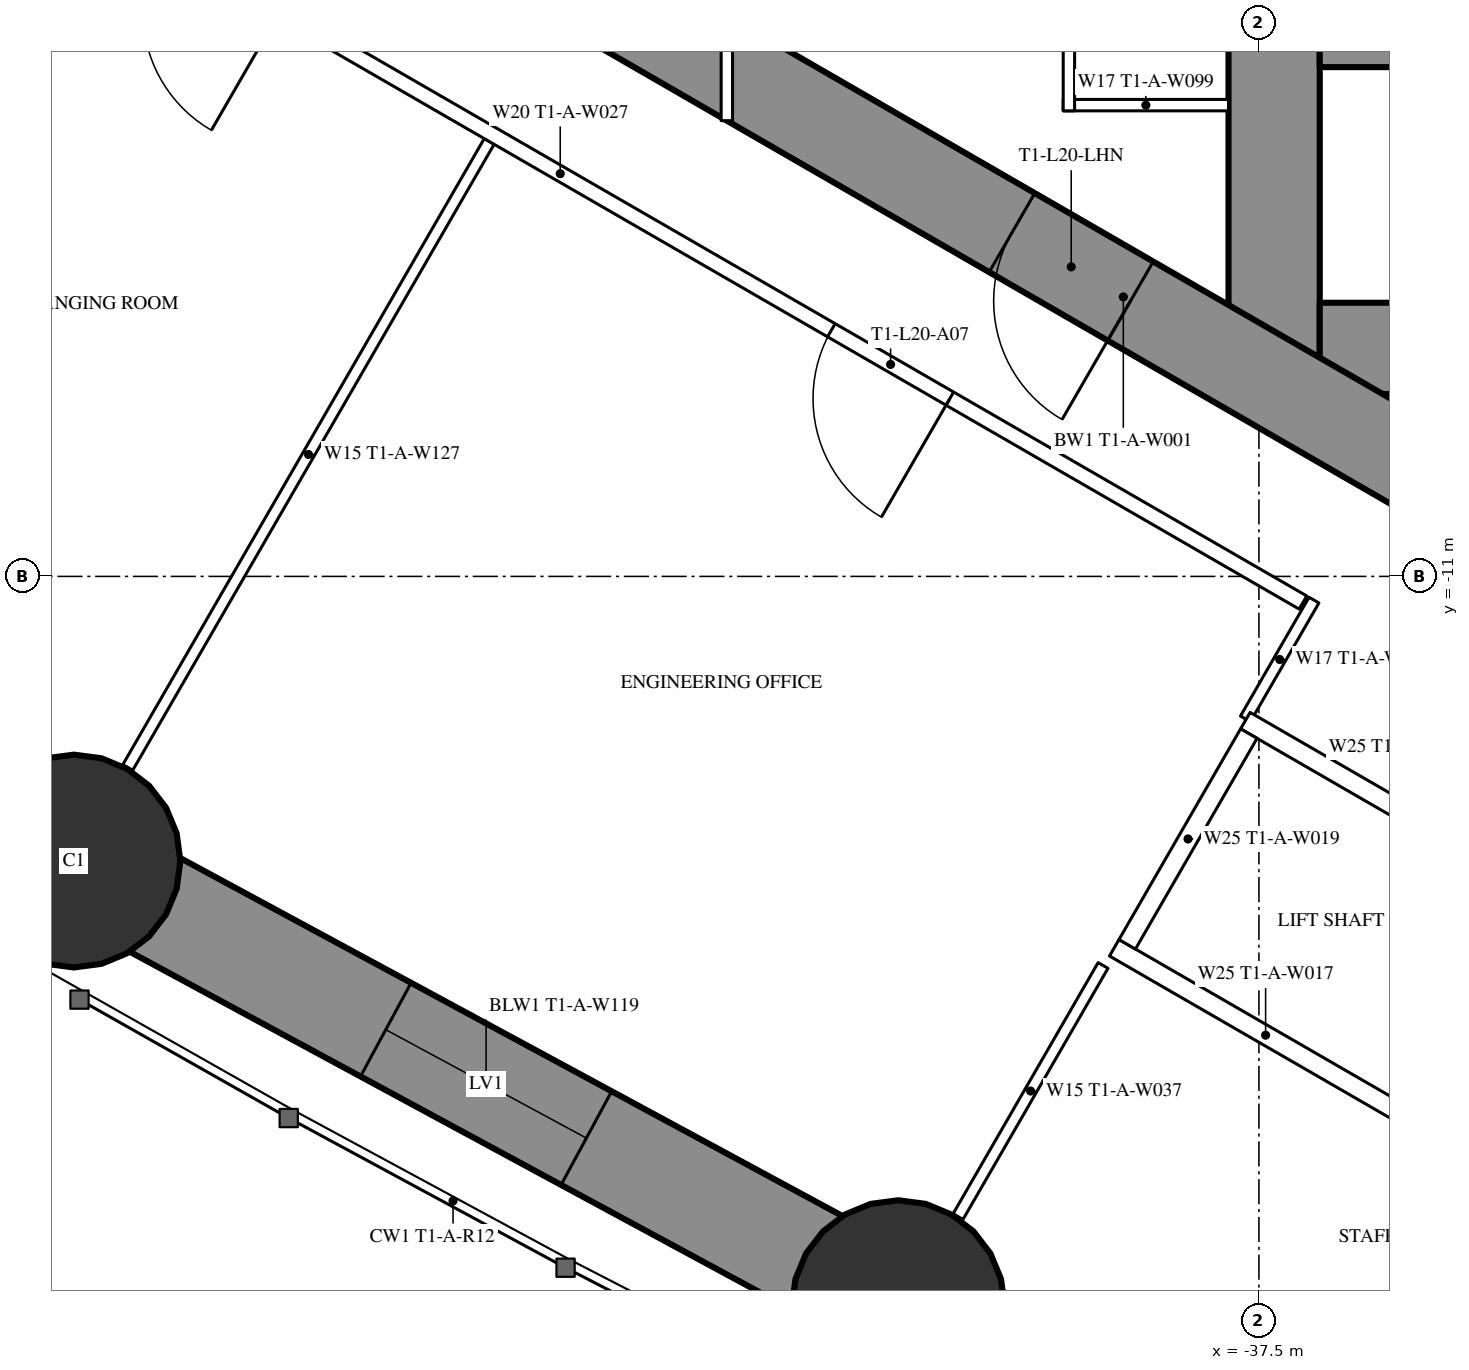
"""IFC4 building model, lengths in metres.
Left out: names, types, materials, properties, quantities, classifications, styles, units other than length and angle.
Written with IfcOpenShell. Run it as: python <this file> out.ifc"""

import sys

from ifc_helpers import new_model, si_unit, direction, frame, frame_2d, origin, origin_2d, place, context, subcontext, project, spatial, rectangle, hollow_circle, extrude, element, fill, save


model = new_model("IFC4")
c1 = context("Model", 3, precision=1e-05, world=origin(), true_north=direction((0.0, 1.0)))
c2 = subcontext(c1, "Body", "Model", "MODEL_VIEW")
j1 = project(units=[si_unit("LENGTHUNIT", "METRE"), si_unit("PLANEANGLEUNIT", "RADIAN")], contexts=[c1])
p1 = place(None, origin())
s1 = spatial("IfcSite", under=j1, at=p1, CompositionType="ELEMENT")
p2 = place(p1, origin())
s2 = spatial("IfcBuilding", under=s1, at=p2, CompositionType="ELEMENT")
p3 = place(p2, frame((0.0, 0.0, 77.5)))
s3 = spatial("IfcBuildingStorey", under=s2, at=p3, CompositionType="ELEMENT", Elevation=77.5)
for number, where, z_axis, x_axis in (
    (1, (-53.09, -14.745, 0.0), (0.0, 0.0, 1.0), (1.0, 0.0, 0.0)),
    (2, (-42.245, -20.607, 0.0), (0.0, 0.0, 1.0), (1.0, 0.0, 0.0)),
):
    element("IfcColumn", number, at=place(p3, frame(where, z_axis=z_axis, x_axis=x_axis)), inside=s3, PredefinedType="COLUMN", context=c2, shape_type="SweptSolid", body=[
        extrude(hollow_circle(Radius=1.4, WallThickness=0.12, at=origin_2d()), origin(), (0.0, 0.0, 1.0), 3.5),
    ])
p4 = place(p3, frame((-37.3, 8.6, 0.0), z_axis=(0.0, 0.0, 1.0), x_axis=(0.0, -1.0, 0.0)))
e3 = element("IfcWall", 3, at=p4, inside=s3, PredefinedType="SHEAR", context=c2, shape_type="SweptSolid", body=[
    extrude(rectangle(XDim=17.2, YDim=1.2, at=frame_2d((8.6, 0.0))), origin(), (0.0, 0.0, 1.0), 3.5),
])
p5 = place(p4, frame((7.7, 0.0, 0.0)))
e4 = element("IfcOpeningElement", 4, at=p5, cuts=e3, PredefinedType="OPENING", context=c2, shape_type="SweptSolid", body=[
    extrude(rectangle(XDim=1.8, YDim=2.2, at=frame_2d((0.9, 1.1))), frame((0.0, 0.61, 0.0), z_axis=(0.0, -1.0, 0.0), x_axis=(1.0, 0.0, 0.0)), (0.0, 0.0, 1.0), 1.22),
])
p6 = place(p3, frame((-28.3, -8.0, 0.0), z_axis=(0.0, 0.0, 1.0), x_axis=(-1.0, 0.0, 0.0)))
e5 = element("IfcWall", 5, at=p6, inside=s3, PredefinedType="SHEAR", context=c2, shape_type="SweptSolid", body=[
    extrude(rectangle(XDim=8.4, YDim=1.2, at=frame_2d((4.2, 0.0))), origin(), (0.0, 0.0, 1.0), 3.5),
])
p7 = place(p6, frame((0.25, 0.0, 0.0)))
e6 = element("IfcOpeningElement", 6, at=p7, cuts=e5, PredefinedType="OPENING", context=c2, shape_type="SweptSolid", body=[
    extrude(rectangle(XDim=1.0, YDim=2.2, at=frame_2d((0.5, 1.1))), frame((0.0, 0.61, 0.0), z_axis=(0.0, -1.0, 0.0), x_axis=(1.0, 0.0, 0.0)), (0.0, 0.0, 1.0), 1.22),
])
p8 = place(p3, frame((-28.3, -4.15, 0.0), z_axis=(0.0, 0.0, 1.0), x_axis=(-1.0, 0.0, 0.0)))
e7 = element("IfcWall", 7, at=p8, inside=s3, PredefinedType="SHEAR", context=c2, shape_type="SweptSolid", body=[
    extrude(rectangle(XDim=8.4, YDim=0.3, at=frame_2d((4.2, 0.0))), origin(), (0.0, 0.0, 1.0), 3.5),
])
p9 = place(p3, frame((-27.2, -14.3, 0.0), z_axis=(0.0, 0.0, 1.0), x_axis=(-0.866024021859, 0.500002393557, 0.0)))
e8 = element("IfcWall", 8, at=p9, inside=s3, PredefinedType="SHEAR", context=c2, shape_type="SweptSolid", body=[
    extrude(rectangle(XDim=27.907, YDim=1.2, at=frame_2d((13.954, 0.0))), origin(), (0.0, 0.0, 1.0), 3.5),
])
p10 = place(p9, frame((4.6, 0.0, 0.0)))
e9 = element("IfcOpeningElement", 9, at=p10, cuts=e8, PredefinedType="OPENING", context=c2, shape_type="SweptSolid", body=[
    extrude(rectangle(XDim=1.0, YDim=2.2, at=frame_2d((0.5, 1.1))), frame((0.0, 0.61, 0.0), z_axis=(0.0, -1.0, 0.0), x_axis=(1.0, 0.0, 0.0)), (0.0, 0.0, 1.0), 1.22),
])
p11 = place(p9, frame((13.845, 0.0, 0.0)))
e10 = element("IfcOpeningElement", 10, at=p11, cuts=e8, PredefinedType="OPENING", context=c2, shape_type="SweptSolid", body=[
    extrude(rectangle(XDim=1.8, YDim=2.2, at=frame_2d((0.9, 1.1))), frame((0.0, 0.61, 0.0), z_axis=(0.0, -1.0, 0.0), x_axis=(1.0, 0.0, 0.0)), (0.0, 0.0, 1.0), 1.22),
])
p12 = place(p3, frame((-63.572, -8.255, 0.0), z_axis=(0.0, 0.0, 1.0), x_axis=(0.850225894333, -0.526418016984, 0.0)))
e11 = element("IfcWall", 11, at=p12, inside=s3, PredefinedType="SHEAR", context=c2, shape_type="SweptSolid", body=[
    extrude(rectangle(XDim=12.328, YDim=1.4, at=frame_2d((6.164, 0.0))), origin(), (0.0, 0.0, 1.0), 3.5),
])
p13 = place(p12, frame((4.664, 0.0, 0.6)))
e12 = element("IfcOpeningElement", 12, at=p13, cuts=e11, PredefinedType="OPENING", context=c2, shape_type="SweptSolid", body=[
    extrude(rectangle(XDim=3.0, YDim=1.2, at=frame_2d((1.5, 0.6))), frame((0.0, 0.71, 0.0), z_axis=(0.0, -1.0, 0.0), x_axis=(1.0, 0.0, 0.0)), (0.0, 0.0, 1.0), 1.42),
])
p14 = place(p3, frame((-53.09, -14.745, 0.0), z_axis=(0.0, 0.0, 1.0), x_axis=(0.879692855603, -0.475542300749, 0.0)))
e13 = element("IfcWall", 13, at=p14, inside=s3, PredefinedType="SHEAR", context=c2, shape_type="SweptSolid", body=[
    extrude(rectangle(XDim=12.328, YDim=1.4, at=frame_2d((6.164, 0.0))), origin(), (0.0, 0.0, 1.0), 3.5),
])
p15 = place(p14, frame((4.664, 0.0, 0.6)))
e14 = element("IfcOpeningElement", 14, at=p15, cuts=e13, PredefinedType="OPENING", context=c2, shape_type="SweptSolid", body=[
    extrude(rectangle(XDim=3.0, YDim=1.2, at=frame_2d((1.5, 0.6))), frame((0.0, 0.71, 0.0), z_axis=(0.0, -1.0, 0.0), x_axis=(1.0, 0.0, 0.0)), (0.0, 0.0, 1.0), 1.42),
])
p16 = place(p3, frame((-42.245, -20.607, 0.0), z_axis=(0.0, 0.0, 1.0), x_axis=(0.926463236197, -0.376385270667, 0.0)))
e15 = element("IfcWall", 15, at=p16, inside=s3, PredefinedType="SHEAR", context=c2, shape_type="SweptSolid", body=[
    extrude(rectangle(XDim=13.537, YDim=1.4, at=frame_2d((6.769, 0.0))), origin(), (0.0, 0.0, 1.0), 3.5),
])
p17 = place(p16, frame((5.269, 0.0, 0.6)))
e16 = element("IfcOpeningElement", 16, at=p17, cuts=e15, PredefinedType="OPENING", context=c2, shape_type="SweptSolid", body=[
    extrude(rectangle(XDim=3.0, YDim=1.2, at=frame_2d((1.5, 0.6))), frame((0.0, 0.71, 0.0), z_axis=(0.0, -1.0, 0.0), x_axis=(1.0, 0.0, 0.0)), (0.0, 0.0, 1.0), 1.42),
])
p18 = place(p3, frame((-47.627, -5.278, 0.0), z_axis=(0.0, 0.0, 1.0), x_axis=(-0.500009844318, -0.86601972009, 0.0)))
e17 = element("IfcWall", 17, at=p18, inside=s3, PredefinedType="PARTITIONING", context=c2, shape_type="SweptSolid", body=[
    extrude(rectangle(XDim=9.51, YDim=0.15, at=frame_2d((4.755, 0.0))), origin(), (0.0, 0.0, 1.0), 2.05),
])
p19 = place(p3, frame((-39.551, -16.118, 0.0), z_axis=(0.0, 0.0, 1.0), x_axis=(-0.499986503906, -0.866033195618, 0.0)))
e18 = element("IfcWall", 18, at=p19, inside=s3, PredefinedType="PARTITIONING", context=c2, shape_type="SweptSolid", body=[
    extrude(rectangle(XDim=3.815, YDim=0.15, at=frame_2d((1.907, 0.0))), origin(), (0.0, 0.0, 1.0), 3.25),
])
p20 = place(p3, frame((-36.92, -11.344, 0.0), z_axis=(0.0, 0.0, 1.0), x_axis=(-0.866028313256, 0.499994960614, 0.0)))
e19 = element("IfcWall", 19, at=p20, inside=s3, PredefinedType="PARTITIONING", context=c2, shape_type="SweptSolid", body=[
    extrude(rectangle(XDim=22.568, YDim=0.2, at=frame_2d((11.284, 0.0))), origin(), (0.0, 0.0, 1.0), 3.25),
])
p21 = place(p20, frame((20.808, 0.0, 0.0)))
e20 = element("IfcOpeningElement", 20, at=p21, cuts=e19, PredefinedType="OPENING", context=c2, shape_type="SweptSolid", body=[
    extrude(rectangle(XDim=1.209, YDim=2.2, at=frame_2d((0.604, 1.1))), frame((0.0, 0.11, 0.0), z_axis=(0.0, -1.0, 0.0), x_axis=(1.0, 0.0, 0.0)), (0.0, 0.0, 1.0), 0.22),
])
p22 = place(p20, frame((15.544, 0.0, 0.0)))
e21 = element("IfcOpeningElement", 21, at=p22, cuts=e19, PredefinedType="OPENING", context=c2, shape_type="SweptSolid", body=[
    extrude(rectangle(XDim=1.8, YDim=2.2, at=frame_2d((0.9, 1.1))), frame((0.0, 0.11, 0.0), z_axis=(0.0, -1.0, 0.0), x_axis=(1.0, 0.0, 0.0)), (0.0, 0.0, 1.0), 0.22),
])
p23 = place(p20, frame((5.365, 0.0, 0.0)))
e22 = element("IfcOpeningElement", 22, at=p23, cuts=e19, PredefinedType="OPENING", context=c2, shape_type="SweptSolid", body=[
    extrude(rectangle(XDim=1.8, YDim=2.2, at=frame_2d((0.9, 1.1))), frame((0.0, 0.11, 0.0), z_axis=(0.0, -1.0, 0.0), x_axis=(1.0, 0.0, 0.0)), (0.0, 0.0, 1.0), 0.22),
])
p24 = place(p3, frame((-36.776, -11.312, 0.0), z_axis=(0.0, 0.0, 1.0), x_axis=(-0.500038651731, -0.866003087047, 0.0)))
e23 = element("IfcWall", 23, at=p24, inside=s3, PredefinedType="PARTITIONING", context=c2, shape_type="SweptSolid", body=[
    extrude(rectangle(XDim=1.804, YDim=0.15, at=frame_2d((0.902, 0.0))), origin(), (0.0, 0.0, 1.0), 3.25),
])
p25 = place(p3, frame((-37.9, -4.8, 0.0), z_axis=(0.0, 0.0, 1.0), x_axis=(-1.0, 0.0, 0.0)))
e24 = element("IfcWall", 24, at=p25, inside=s3, PredefinedType="PARTITIONING", context=c2, shape_type="SweptSolid", body=[
    extrude(rectangle(XDim=2.175, YDim=0.15, at=frame_2d((1.087, 0.0))), origin(), (0.0, 0.0, 1.0), 3.25),
])
p26 = place(p3, frame((-40.0, -1.125, 0.0), z_axis=(0.0, 0.0, 1.0), x_axis=(0.0, -1.0, 0.0)))
e25 = element("IfcWall", 25, at=p26, inside=s3, PredefinedType="PARTITIONING", context=c2, shape_type="SweptSolid", body=[
    extrude(rectangle(XDim=3.75, YDim=0.15, at=frame_2d((1.875, 0.0))), origin(), (0.0, 0.0, 1.0), 3.25),
])
p27 = place(p26, frame((1.375, 0.0, 0.0)))
e26 = element("IfcOpeningElement", 26, at=p27, cuts=e25, PredefinedType="OPENING", context=c2, shape_type="SweptSolid", body=[
    extrude(rectangle(XDim=1.0, YDim=2.2, at=frame_2d((0.5, 1.1))), frame((0.0, 0.085, 0.0), z_axis=(0.0, -1.0, 0.0), x_axis=(1.0, 0.0, 0.0)), (0.0, 0.0, 1.0), 0.17),
])
p28 = place(p3, frame((-44.5, 4.169, 0.0), z_axis=(0.0, 0.0, 1.0), x_axis=(0.0, -1.0, 0.0)))
e27 = element("IfcWall", 27, at=p28, inside=s3, PredefinedType="PARTITIONING", context=c2, shape_type="SweptSolid", body=[
    extrude(rectangle(XDim=9.173, YDim=0.15, at=frame_2d((4.587, 0.0))), origin(), (0.0, 0.0, 1.0), 3.25),
])
p29 = place(p28, frame((1.167, 0.0, 0.0)))
e28 = element("IfcOpeningElement", 28, at=p29, cuts=e27, PredefinedType="OPENING", context=c2, shape_type="SweptSolid", body=[
    extrude(rectangle(XDim=1.0, YDim=2.2, at=frame_2d((0.5, 1.1))), frame((0.0, 0.085, 0.0), z_axis=(0.0, -1.0, 0.0), x_axis=(1.0, 0.0, 0.0)), (0.0, 0.0, 1.0), 0.17),
])
p30 = place(p28, frame((6.171, 0.0, 0.0)))
e29 = element("IfcOpeningElement", 29, at=p30, cuts=e27, PredefinedType="OPENING", context=c2, shape_type="SweptSolid", body=[
    extrude(rectangle(XDim=1.0, YDim=2.2, at=frame_2d((0.5, 1.1))), frame((0.0, 0.085, 0.0), z_axis=(0.0, -1.0, 0.0), x_axis=(1.0, 0.0, 0.0)), (0.0, 0.0, 1.0), 0.17),
])
p31 = place(p3, frame((-33.696, -15.197, 0.0), z_axis=(0.0, 0.0, 1.0), x_axis=(-0.865976953817, 0.500083908417, 0.0)))
e30 = element("IfcWall", 30, at=p31, inside=s3, PredefinedType="PARTITIONING", context=c2, shape_type="SweptSolid", body=[
    extrude(rectangle(XDim=4.599, YDim=0.25, at=frame_2d((2.3, 0.0))), origin(), (0.0, 0.0, 1.0), 3.25),
])
p32 = place(p3, frame((-35.42, -18.186, 0.0), z_axis=(0.0, 0.0, 1.0), x_axis=(-0.865990227814, 0.50006092162, 0.0)))
e31 = element("IfcWall", 31, at=p32, inside=s3, PredefinedType="PARTITIONING", context=c2, shape_type="SweptSolid", body=[
    extrude(rectangle(XDim=4.6, YDim=0.25, at=frame_2d((2.3, 0.0))), origin(), (0.0, 0.0, 1.0), 3.25),
])
p33 = place(p3, frame((-37.633, -13.068, 0.0), z_axis=(0.0, 0.0, 1.0), x_axis=(-0.499872130319, -0.866099216793, 0.0)))
e32 = element("IfcWall", 32, at=p33, inside=s3, PredefinedType="PARTITIONING", context=c2, shape_type="SweptSolid", body=[
    extrude(rectangle(XDim=3.2, YDim=0.25, at=frame_2d((1.6, 0.0))), origin(), (0.0, 0.0, 1.0), 3.25),
])
p34 = place(p15, origin())
e33 = element("IfcWindow", 33, at=p34, inside=s3, PartitioningType="SINGLE_PANEL", PredefinedType="WINDOW", context=c2, shape_type="SweptSolid", body=[
    extrude(rectangle(XDim=3.0, YDim=1.2, at=frame_2d((1.5, 0.6))), frame((0.0, 0.03, 0.0), z_axis=(0.0, -1.0, 0.0), x_axis=(1.0, 0.0, 0.0)), (0.0, 0.0, 1.0), 0.06),
])
fill(e14, e33)
p35 = place(p23, origin())
e34 = element("IfcDoor", 34, at=p35, inside=s3, OperationType="DOUBLE_DOOR_SINGLE_SWING", PredefinedType="DOOR", context=c2, shape_type="SweptSolid", body=[
    extrude(rectangle(XDim=1.8, YDim=2.2, at=frame_2d((0.9, 1.1))), frame((0.0, 0.025, 0.0), z_axis=(0.0, -1.0, 0.0), x_axis=(1.0, 0.0, 0.0)), (0.0, 0.0, 1.0), 0.05),
])
fill(e22, e34)
p36 = place(p11, origin())
e35 = element("IfcDoor", 35, at=p36, inside=s3, OperationType="DOUBLE_DOOR_SINGLE_SWING", PredefinedType="DOOR", context=c2, shape_type="SweptSolid", body=[
    extrude(rectangle(XDim=1.8, YDim=2.2, at=frame_2d((0.9, 1.1))), frame((0.0, 0.025, 0.0), z_axis=(0.0, -1.0, 0.0), x_axis=(1.0, 0.0, 0.0)), (0.0, 0.0, 1.0), 0.05),
])
fill(e10, e35)
save(model, sys.argv[1])
